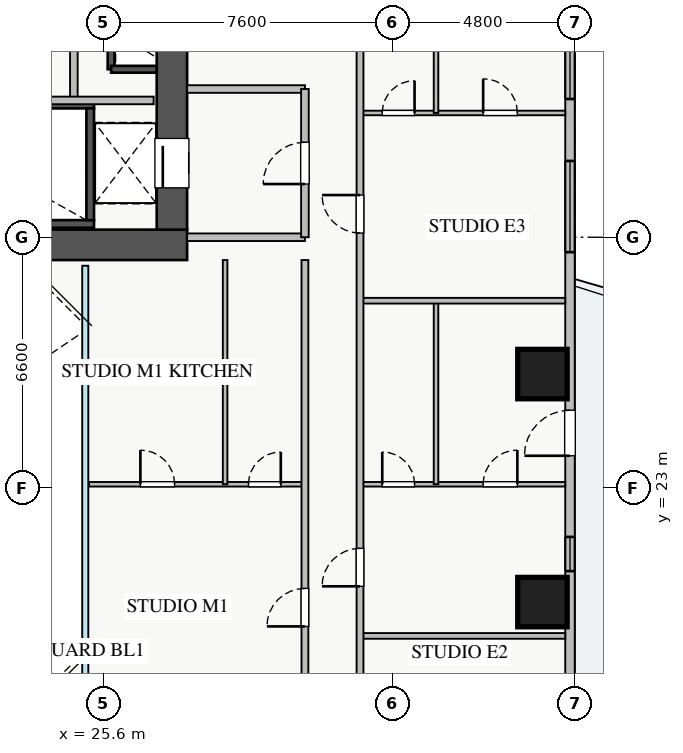
"""IFC4 building model, lengths in metres.
Left out: names, types, materials, properties, quantities, classifications, styles, units other than length and angle.
Written with IfcOpenShell. Run it as: python <this file> out.ifc"""

import sys

from ifc_helpers import new_model, si_unit, direction, frame, frame_2d, origin, origin_2d, place, context, subcontext, project, spatial, rectangle, extrude, source, transform, mapped, element, fill, save


model = new_model("IFC4")
c1 = context("Model", 3, precision=1e-05, world=origin(), true_north=direction((0.0, 1.0)))
c2 = subcontext(c1, "Body", "Model", "MODEL_VIEW")
j1 = project(units=[si_unit("LENGTHUNIT", "METRE"), si_unit("PLANEANGLEUNIT", "RADIAN")], contexts=[c1])
p1 = place(None, origin())
s1 = spatial("IfcSite", under=j1, at=p1, CompositionType="ELEMENT")
p2 = place(p1, origin())
s2 = spatial("IfcBuilding", under=s1, at=p2, CompositionType="ELEMENT")
p3 = place(p2, frame((0.0, 0.0, 42.5)))
s3 = spatial("IfcBuildingStorey", under=s2, at=p3, CompositionType="ELEMENT", Elevation=42.5)
p4 = place(p3, frame((25.8, 34.02, 0.0), z_axis=(0.0, 0.0, 1.0), x_axis=(0.0, 1.0, 0.0)))
e1 = element("IfcWall", 1, at=p4, inside=s3, PredefinedType="SHEAR", context=c2, shape_type="SweptSolid", body=[
    extrude(rectangle(XDim=1.06, YDim=0.18, at=frame_2d((0.53, 0.0))), origin(), (0.0, 0.0, 1.0), 3.03),
])
p5 = place(p3, frame((25.8, 34.02, 0.0), z_axis=(0.0, 0.0, 1.0), x_axis=(1.0, 0.0, 0.0)))
e2 = element("IfcWall", 2, at=p5, inside=s3, PredefinedType="SHEAR", context=c2, shape_type="SweptSolid", body=[
    extrude(rectangle(XDim=1.2, YDim=0.18, at=frame_2d((0.6, 0.0))), origin(), (0.0, 0.0, 1.0), 3.03),
])
p6 = place(p3, frame((18.2, 29.95, 0.0), z_axis=(0.0, 0.0, 1.0), x_axis=(1.0, 0.0, 0.0)))
e3 = element("IfcWall", 3, at=p6, inside=s3, PredefinedType="SHEAR", context=c2, shape_type="SweptSolid", body=[
    extrude(rectangle(XDim=7.15, YDim=0.2, at=frame_2d((3.575, 0.0))), origin(), (0.0, 0.0, 1.0), 3.25),
])
p7 = place(p3, frame((18.2, 33.09, 0.0), z_axis=(0.0, 0.0, 1.0), x_axis=(1.0, 0.0, 0.0)))
e4 = element("IfcWall", 4, at=p7, inside=s3, PredefinedType="SHEAR", context=c2, shape_type="SweptSolid", body=[
    extrude(rectangle(XDim=7.15, YDim=0.2, at=frame_2d((3.575, 0.0))), origin(), (0.0, 0.0, 1.0), 3.25),
])
p8 = place(p7, frame((0.35, 0.0, 0.0)))
e5 = element("IfcOpeningElement", 5, at=p8, cuts=e4, PredefinedType="OPENING", context=c2, shape_type="SweptSolid", body=[
    extrude(rectangle(XDim=1.1, YDim=2.05, at=frame_2d((0.55, 1.025))), frame((0.0, 0.11, 0.0), z_axis=(0.0, -1.0, 0.0), x_axis=(1.0, 0.0, 0.0)), (0.0, 0.0, 1.0), 0.22),
])
p9 = place(p3, frame((25.25, 30.05, 0.0), z_axis=(0.0, 0.0, 1.0), x_axis=(0.0, 1.0, 0.0)))
e6 = element("IfcWall", 6, at=p9, inside=s3, PredefinedType="SHEAR", context=c2, shape_type="SweptSolid", body=[
    extrude(rectangle(XDim=2.94, YDim=0.2, at=frame_2d((1.47, 0.0))), origin(), (0.0, 0.0, 1.0), 3.25),
])
p10 = place(p3, frame((10.2, 29.4, 0.0), z_axis=(0.0, 0.0, 1.0), x_axis=(1.0, 0.0, 0.0)))
e7 = element("IfcWall", 7, at=p10, inside=s3, PredefinedType="SHEAR", context=c2, shape_type="SweptSolid", body=[
    extrude(rectangle(XDim=17.6, YDim=0.8, at=frame_2d((8.8, 0.0))), origin(), (0.0, 0.0, 1.0), 3.25),
])
p11 = place(p3, frame((27.4, 29.8, 0.0), z_axis=(0.0, 0.0, 1.0), x_axis=(0.0, 1.0, 0.0)))
e8 = element("IfcWall", 8, at=p11, inside=s3, PredefinedType="SHEAR", context=c2, shape_type="SweptSolid", body=[
    extrude(rectangle(XDim=5.6, YDim=0.8, at=frame_2d((2.8, 0.0))), origin(), (0.0, 0.0, 1.0), 3.25),
])
p12 = place(p11, frame((1.1, 0.0, 0.0)))
e9 = element("IfcOpeningElement", 9, at=p12, cuts=e8, PredefinedType="OPENING", context=c2, shape_type="SweptSolid", body=[
    extrude(rectangle(XDim=1.3, YDim=2.05, at=frame_2d((0.65, 1.025))), frame((0.0, 0.41, 0.0), z_axis=(0.0, -1.0, 0.0), x_axis=(1.0, 0.0, 0.0)), (0.0, 0.0, 1.0), 0.82),
])
m1 = source(origin(), c2, "Body", "SweptSolid", [
    extrude(rectangle(XDim=1.3, YDim=1.3, at=origin_2d()), origin(), (0.0, 0.0, 1.0), 3.25),
])
for number, where, z_axis, x_axis in (
    (10, (37.15, 20.0, 0.0), (0.0, 0.0, 1.0), (1.0, 0.0, 0.0)),
    (11, (37.15, 26.0, 0.0), (0.0, 0.0, 1.0), (1.0, 0.0, 0.0)),
):
    element("IfcColumn", number, at=place(p3, frame(where, z_axis=z_axis, x_axis=x_axis)), inside=s3, PredefinedType="COLUMN", context=c2, shape_type="MappedRepresentation", body=[
        mapped(m1, transform((0.0, 0.0, 0.0), x_axis=(1.0, 0.0, 0.0), y_axis=(0.0, 1.0, 0.0), z_axis=(0.0, 0.0, 1.0), scale=1.0)),
    ])
p13 = place(p3, frame((37.875, 9.45, 0.0), z_axis=(0.0, 0.0, 1.0), x_axis=(0.0, 1.0, 0.0)))
e12 = element("IfcWall", 12, at=p13, inside=s3, PredefinedType="STANDARD", context=c2, shape_type="SweptSolid", body=[
    extrude(rectangle(XDim=27.1, YDim=0.25, at=frame_2d((13.55, 0.0))), origin(), (0.0, 0.0, 1.0), 2.57),
])
p14 = place(p13, frame((14.4, 0.0, 0.0)))
e13 = element("IfcOpeningElement", 13, at=p14, cuts=e12, PredefinedType="OPENING", context=c2, shape_type="SweptSolid", body=[
    extrude(rectangle(XDim=1.2, YDim=2.1, at=frame_2d((0.6, 1.05))), frame((0.0, 0.135, 0.0), z_axis=(0.0, -1.0, 0.0), x_axis=(1.0, 0.0, 0.0)), (0.0, 0.0, 1.0), 0.27),
])
p15 = place(p13, frame((2.188, 0.0, 0.9)))
e14 = element("IfcOpeningElement", 14, at=p15, cuts=e12, PredefinedType="OPENING", context=c2, shape_type="SweptSolid", body=[
    extrude(rectangle(XDim=2.4, YDim=1.48, at=frame_2d((1.2, 0.74))), frame((0.0, 0.135, 0.0), z_axis=(0.0, -1.0, 0.0), x_axis=(1.0, 0.0, 0.0)), (0.0, 0.0, 1.0), 0.27),
])
p16 = place(p13, frame((23.788, 0.0, 0.9)))
e15 = element("IfcOpeningElement", 15, at=p16, cuts=e12, PredefinedType="OPENING", context=c2, shape_type="SweptSolid", body=[
    extrude(rectangle(XDim=1.8, YDim=1.5, at=frame_2d((0.9, 0.75))), frame((0.0, 0.135, 0.0), z_axis=(0.0, -1.0, 0.0), x_axis=(1.0, 0.0, 0.0)), (0.0, 0.0, 1.0), 0.27),
])
p17 = place(p13, frame((19.758, 0.0, 0.9)))
e16 = element("IfcOpeningElement", 16, at=p17, cuts=e12, PredefinedType="OPENING", context=c2, shape_type="SweptSolid", body=[
    extrude(rectangle(XDim=2.4, YDim=1.5, at=frame_2d((1.2, 0.75))), frame((0.0, 0.135, 0.0), z_axis=(0.0, -1.0, 0.0), x_axis=(1.0, 0.0, 0.0)), (0.0, 0.0, 1.0), 0.27),
])
p18 = place(p13, frame((11.365, 0.0, 0.9)))
e17 = element("IfcOpeningElement", 17, at=p18, cuts=e12, PredefinedType="OPENING", context=c2, shape_type="SweptSolid", body=[
    extrude(rectangle(XDim=0.9, YDim=1.2, at=frame_2d((0.45, 0.6))), frame((0.0, 0.135, 0.0), z_axis=(0.0, -1.0, 0.0), x_axis=(1.0, 0.0, 0.0)), (0.0, 0.0, 1.0), 0.27),
])
for number, where, z_axis, x_axis in (
    (18, (27.8, 29.6, 0.0), (0.0, 0.0, 1.0), (1.0, 0.0, 0.0)),
    (19, (27.8, 33.5, 0.0), (0.0, 0.0, 1.0), (1.0, 0.0, 0.0)),
):
    element("IfcWall", number, at=place(p3, frame(where, z_axis=z_axis, x_axis=x_axis)), inside=s3, PredefinedType="PARTITIONING", context=c2, shape_type="SweptSolid", body=[
        extrude(rectangle(XDim=3.1, YDim=0.2, at=frame_2d((1.55, 0.0))), origin(), (0.0, 0.0, 1.0), 3.03),
    ])
p19 = place(p3, frame((30.9, 29.6, 0.0), z_axis=(0.0, 0.0, 1.0), x_axis=(0.0, 1.0, 0.0)))
e20 = element("IfcWall", 20, at=p19, inside=s3, PredefinedType="PARTITIONING", context=c2, shape_type="SweptSolid", body=[
    extrude(rectangle(XDim=3.9, YDim=0.2, at=frame_2d((1.95, 0.0))), origin(), (0.0, 0.0, 1.0), 3.03),
])
p20 = place(p19, frame((1.4, 0.0, 0.0)))
e21 = element("IfcOpeningElement", 21, at=p20, cuts=e20, PredefinedType="OPENING", context=c2, shape_type="SweptSolid", body=[
    extrude(rectangle(XDim=1.1, YDim=2.05, at=frame_2d((0.55, 1.025))), frame((0.0, 0.11, 0.0), z_axis=(0.0, -1.0, 0.0), x_axis=(1.0, 0.0, 0.0)), (0.0, 0.0, 1.0), 0.22),
])
p21 = place(p3, frame((24.82, 33.2, 0.0), z_axis=(0.0, 0.0, 1.0), x_axis=(0.0, 1.0, 0.0)))
e22 = element("IfcWall", 22, at=p21, inside=s3, PredefinedType="PARTITIONING", context=c2, shape_type="SweptSolid", body=[
    extrude(rectangle(XDim=2.65, YDim=0.2, at=frame_2d((1.325, 0.0))), origin(), (0.0, 0.0, 1.0), 3.03),
])
p22 = place(p3, frame((21.75, 33.2, 0.0), z_axis=(0.0, 0.0, 1.0), x_axis=(1.0, 0.0, 0.0)))
e23 = element("IfcWall", 23, at=p22, inside=s3, PredefinedType="PARTITIONING", context=c2, shape_type="SweptSolid", body=[
    extrude(rectangle(XDim=5.17, YDim=0.2, at=frame_2d((2.585, 0.0))), origin(), (0.0, 0.0, 1.0), 3.03),
])
p23 = place(p3, frame((32.35, 23.1, 0.0), z_axis=(0.0, 0.0, 1.0), x_axis=(1.0, 0.0, 0.0)))
e24 = element("IfcWall", 24, at=p23, inside=s3, PredefinedType="PLUMBINGWALL", context=c2, shape_type="SweptSolid", body=[
    extrude(rectangle(XDim=5.4, YDim=0.12, at=frame_2d((2.7, 0.0))), origin(), (0.0, 0.0, 1.0), 3.03),
])
p24 = place(p23, frame((0.585, 0.0, 0.0)))
e25 = element("IfcOpeningElement", 25, at=p24, cuts=e24, PredefinedType="OPENING", context=c2, shape_type="SweptSolid", body=[
    extrude(rectangle(XDim=0.85, YDim=2.05, at=frame_2d((0.425, 1.025))), frame((0.0, 0.07, 0.0), z_axis=(0.0, -1.0, 0.0), x_axis=(1.0, 0.0, 0.0)), (0.0, 0.0, 1.0), 0.14),
])
p25 = place(p23, frame((3.24, 0.0, 0.0)))
e26 = element("IfcOpeningElement", 26, at=p25, cuts=e24, PredefinedType="OPENING", context=c2, shape_type="SweptSolid", body=[
    extrude(rectangle(XDim=0.9, YDim=2.05, at=frame_2d((0.45, 1.025))), frame((0.0, 0.07, 0.0), z_axis=(0.0, -1.0, 0.0), x_axis=(1.0, 0.0, 0.0)), (0.0, 0.0, 1.0), 0.14),
])
p26 = place(p3, frame((34.35, 23.1, 0.0), z_axis=(0.0, 0.0, 1.0), x_axis=(0.0, 1.0, 0.0)))
e27 = element("IfcWall", 27, at=p26, inside=s3, PredefinedType="PLUMBINGWALL", context=c2, shape_type="SweptSolid", body=[
    extrude(rectangle(XDim=4.83, YDim=0.12, at=frame_2d((2.415, 0.0))), origin(), (0.0, 0.0, 1.0), 3.03),
])
p27 = place(p3, frame((32.35, 19.11, 0.0), z_axis=(0.0, 0.0, 1.0), x_axis=(1.0, 0.0, 0.0)))
e28 = element("IfcWall", 28, at=p27, inside=s3, PredefinedType="PARTITIONING", context=c2, shape_type="SweptSolid", body=[
    extrude(rectangle(XDim=5.4, YDim=0.15, at=frame_2d((2.7, 0.0))), origin(), (0.0, 0.0, 1.0), 3.03),
])
p28 = place(p3, frame((32.35, 32.87, 0.0), z_axis=(0.0, 0.0, 1.0), x_axis=(1.0, 0.0, 0.0)))
e29 = element("IfcWall", 29, at=p28, inside=s3, PredefinedType="PLUMBINGWALL", context=c2, shape_type="SweptSolid", body=[
    extrude(rectangle(XDim=5.4, YDim=0.12, at=frame_2d((2.7, 0.0))), origin(), (0.0, 0.0, 1.0), 3.03),
])
p29 = place(p28, frame((0.585, 0.0, 0.0)))
e30 = element("IfcOpeningElement", 30, at=p29, cuts=e29, PredefinedType="OPENING", context=c2, shape_type="SweptSolid", body=[
    extrude(rectangle(XDim=0.85, YDim=2.05, at=frame_2d((0.425, 1.025))), frame((0.0, 0.07, 0.0), z_axis=(0.0, -1.0, 0.0), x_axis=(1.0, 0.0, 0.0)), (0.0, 0.0, 1.0), 0.14),
])
p30 = place(p28, frame((3.24, 0.0, 0.0)))
e31 = element("IfcOpeningElement", 31, at=p30, cuts=e29, PredefinedType="OPENING", context=c2, shape_type="SweptSolid", body=[
    extrude(rectangle(XDim=0.9, YDim=2.05, at=frame_2d((0.45, 1.025))), frame((0.0, 0.07, 0.0), z_axis=(0.0, -1.0, 0.0), x_axis=(1.0, 0.0, 0.0)), (0.0, 0.0, 1.0), 0.14),
])
p31 = place(p3, frame((34.35, 32.87, 0.0), z_axis=(0.0, 0.0, 1.0), x_axis=(0.0, 1.0, 0.0)))
e32 = element("IfcWall", 32, at=p31, inside=s3, PredefinedType="PLUMBINGWALL", context=c2, shape_type="SweptSolid", body=[
    extrude(rectangle(XDim=4.21, YDim=0.12, at=frame_2d((2.105, 0.0))), origin(), (0.0, 0.0, 1.0), 3.03),
])
p32 = place(p3, frame((32.35, 27.93, 0.0), z_axis=(0.0, 0.0, 1.0), x_axis=(1.0, 0.0, 0.0)))
e33 = element("IfcWall", 33, at=p32, inside=s3, PredefinedType="PARTITIONING", context=c2, shape_type="SweptSolid", body=[
    extrude(rectangle(XDim=5.4, YDim=0.15, at=frame_2d((2.7, 0.0))), origin(), (0.0, 0.0, 1.0), 2.731),
])
p33 = place(p3, frame((32.35, 7.21, 0.0), z_axis=(0.0, 0.0, 1.0), x_axis=(0.0, 1.0, 0.0)))
e34 = element("IfcWall", 34, at=p33, inside=s3, PredefinedType="PARTITIONING", context=c2, shape_type="SweptSolid", body=[
    extrude(rectangle(XDim=31.23, YDim=0.18, at=frame_2d((15.615, 0.0))), origin(), (0.0, 0.0, 1.0), 2.825),
])
p34 = place(p33, frame((30.09, 0.0, 0.0)))
e35 = element("IfcOpeningElement", 35, at=p34, cuts=e34, PredefinedType="OPENING", context=c2, shape_type="SweptSolid", body=[
    extrude(rectangle(XDim=0.9, YDim=2.05, at=frame_2d((0.45, 1.025))), frame((0.0, 0.1, 0.0), z_axis=(0.0, -1.0, 0.0), x_axis=(1.0, 0.0, 0.0)), (0.0, 0.0, 1.0), 0.2),
])
p35 = place(p33, frame((0.415, 0.0, 0.0)))
e36 = element("IfcOpeningElement", 36, at=p35, cuts=e34, PredefinedType="OPENING", context=c2, shape_type="SweptSolid", body=[
    extrude(rectangle(XDim=0.9, YDim=2.05, at=frame_2d((0.45, 1.025))), frame((0.0, 0.1, 0.0), z_axis=(0.0, -1.0, 0.0), x_axis=(1.0, 0.0, 0.0)), (0.0, 0.0, 1.0), 0.2),
])
p36 = place(p33, frame((6.305, 0.0, 0.0)))
e37 = element("IfcOpeningElement", 37, at=p36, cuts=e34, PredefinedType="OPENING", context=c2, shape_type="SweptSolid", body=[
    extrude(rectangle(XDim=1.0, YDim=2.05, at=frame_2d((0.5, 1.025))), frame((0.0, 0.1, 0.0), z_axis=(0.0, -1.0, 0.0), x_axis=(1.0, 0.0, 0.0)), (0.0, 0.0, 1.0), 0.2),
])
p37 = place(p33, frame((13.205, 0.0, 0.0)))
e38 = element("IfcOpeningElement", 38, at=p37, cuts=e34, PredefinedType="OPENING", context=c2, shape_type="SweptSolid", body=[
    extrude(rectangle(XDim=1.0, YDim=2.05, at=frame_2d((0.5, 1.025))), frame((0.0, 0.1, 0.0), z_axis=(0.0, -1.0, 0.0), x_axis=(1.0, 0.0, 0.0)), (0.0, 0.0, 1.0), 0.2),
])
p38 = place(p33, frame((22.5, 0.0, 0.0)))
e39 = element("IfcOpeningElement", 39, at=p38, cuts=e34, PredefinedType="OPENING", context=c2, shape_type="SweptSolid", body=[
    extrude(rectangle(XDim=1.0, YDim=2.05, at=frame_2d((0.5, 1.025))), frame((0.0, 0.1, 0.0), z_axis=(0.0, -1.0, 0.0), x_axis=(1.0, 0.0, 0.0)), (0.0, 0.0, 1.0), 0.2),
])
p39 = place(p3, frame((25.22, 23.1, 0.0), z_axis=(0.0, 0.0, 1.0), x_axis=(1.0, 0.0, 0.0)))
e40 = element("IfcWall", 40, at=p39, inside=s3, PredefinedType="PLUMBINGWALL", context=c2, shape_type="SweptSolid", body=[
    extrude(rectangle(XDim=5.68, YDim=0.12, at=frame_2d((2.84, 0.0))), origin(), (0.0, 0.0, 1.0), 3.03),
])
p40 = place(p39, frame((1.35, 0.0, 0.0)))
e41 = element("IfcOpeningElement", 41, at=p40, cuts=e40, PredefinedType="OPENING", context=c2, shape_type="SweptSolid", body=[
    extrude(rectangle(XDim=0.9, YDim=2.05, at=frame_2d((0.45, 1.025))), frame((0.0, 0.07, 0.0), z_axis=(0.0, -1.0, 0.0), x_axis=(1.0, 0.0, 0.0)), (0.0, 0.0, 1.0), 0.14),
])
p41 = place(p39, frame((4.195, 0.0, 0.0)))
e42 = element("IfcOpeningElement", 42, at=p41, cuts=e40, PredefinedType="OPENING", context=c2, shape_type="SweptSolid", body=[
    extrude(rectangle(XDim=0.85, YDim=2.05, at=frame_2d((0.425, 1.025))), frame((0.0, 0.07, 0.0), z_axis=(0.0, -1.0, 0.0), x_axis=(1.0, 0.0, 0.0)), (0.0, 0.0, 1.0), 0.14),
])
p42 = place(p3, frame((28.8, 23.1, 0.0), z_axis=(0.0, 0.0, 1.0), x_axis=(0.0, 1.0, 0.0)))
e43 = element("IfcWall", 43, at=p42, inside=s3, PredefinedType="PLUMBINGWALL", context=c2, shape_type="SweptSolid", body=[
    extrude(rectangle(XDim=5.9, YDim=0.12, at=frame_2d((2.95, 0.0))), origin(), (0.0, 0.0, 1.0), 3.03),
])
p43 = place(p3, frame((30.9, 17.0, 0.0), z_axis=(0.0, 0.0, 1.0), x_axis=(0.0, 1.0, 0.0)))
e44 = element("IfcWall", 44, at=p43, inside=s3, PredefinedType="PARTITIONING", context=c2, shape_type="SweptSolid", body=[
    extrude(rectangle(XDim=12.0, YDim=0.18, at=frame_2d((6.0, 0.0))), origin(), (0.0, 0.0, 1.0), 3.03),
])
p44 = place(p43, frame((2.36, 0.0, 0.0)))
e45 = element("IfcOpeningElement", 45, at=p44, cuts=e44, PredefinedType="OPENING", context=c2, shape_type="SweptSolid", body=[
    extrude(rectangle(XDim=1.0, YDim=2.05, at=frame_2d((0.5, 1.025))), frame((0.0, 0.1, 0.0), z_axis=(0.0, -1.0, 0.0), x_axis=(1.0, 0.0, 0.0)), (0.0, 0.0, 1.0), 0.2),
])
m2 = source(origin(), c2, "Body", "SweptSolid", [
    extrude(rectangle(XDim=1.2, YDim=2.1, at=frame_2d((0.6, 1.05))), frame((0.0, 0.025, 0.0), z_axis=(0.0, -1.0, 0.0), x_axis=(1.0, 0.0, 0.0)), (0.0, 0.0, 1.0), 0.05),
])
p45 = place(p14, origin())
e46 = element("IfcDoor", 46, at=p45, inside=s3, OperationType="SINGLE_SWING_LEFT", PredefinedType="DOOR", context=c2, shape_type="MappedRepresentation", body=[
    mapped(m2, transform((0.0, 0.0, 0.0), x_axis=(1.0, 0.0, 0.0), y_axis=(0.0, 1.0, 0.0), z_axis=(0.0, 0.0, 1.0), scale=1.0)),
])
fill(e13, e46)
m3 = source(origin(), c2, "Body", "SweptSolid", [
    extrude(rectangle(XDim=1.8, YDim=1.5, at=frame_2d((0.9, 0.75))), frame((0.0, 0.03, 0.0), z_axis=(0.0, -1.0, 0.0), x_axis=(1.0, 0.0, 0.0)), (0.0, 0.0, 1.0), 0.06),
])
p46 = place(p16, origin())
e47 = element("IfcWindow", 47, at=p46, inside=s3, PartitioningType="TRIPLE_PANEL_VERTICAL", PredefinedType="WINDOW", context=c2, shape_type="MappedRepresentation", body=[
    mapped(m3, transform((0.0, 0.0, 0.0), x_axis=(1.0, 0.0, 0.0), y_axis=(0.0, 1.0, 0.0), z_axis=(0.0, 0.0, 1.0), scale=1.0)),
])
fill(e15, e47)
m4 = source(origin(), c2, "Body", "SweptSolid", [
    extrude(rectangle(XDim=1.3, YDim=2.05, at=frame_2d((0.65, 1.025))), frame((0.0, 0.025, 0.0), z_axis=(0.0, -1.0, 0.0), x_axis=(1.0, 0.0, 0.0)), (0.0, 0.0, 1.0), 0.05),
])
p47 = place(p12, origin())
e48 = element("IfcDoor", 48, at=p47, inside=s3, OperationType="SLIDING_TO_LEFT", PredefinedType="DOOR", context=c2, shape_type="MappedRepresentation", body=[
    mapped(m4, transform((0.0, 0.0, 0.0), x_axis=(1.0, 0.0, 0.0), y_axis=(0.0, 1.0, 0.0), z_axis=(0.0, 0.0, 1.0), scale=1.0)),
])
fill(e9, e48)
m5 = source(origin(), c2, "Body", "SweptSolid", [
    extrude(rectangle(XDim=1.1, YDim=2.05, at=frame_2d((0.55, 1.025))), frame((0.0, 0.025, 0.0), z_axis=(0.0, -1.0, 0.0), x_axis=(1.0, 0.0, 0.0)), (0.0, 0.0, 1.0), 0.05),
])
p48 = place(p20, origin())
e49 = element("IfcDoor", 49, at=p48, inside=s3, OperationType="SINGLE_SWING_LEFT", PredefinedType="DOOR", context=c2, shape_type="MappedRepresentation", body=[
    mapped(m5, transform((0.0, 0.0, 0.0), x_axis=(1.0, 0.0, 0.0), y_axis=(0.0, 1.0, 0.0), z_axis=(0.0, 0.0, 1.0), scale=1.0)),
])
fill(e21, e49)
m6 = source(origin(), c2, "Body", "SweptSolid", [
    extrude(rectangle(XDim=0.85, YDim=2.05, at=frame_2d((0.425, 1.025))), frame((0.0, 0.025, 0.0), z_axis=(0.0, -1.0, 0.0), x_axis=(1.0, 0.0, 0.0)), (0.0, 0.0, 1.0), 0.05),
])
p49 = place(p24, origin())
e50 = element("IfcDoor", 50, at=p49, inside=s3, OperationType="SINGLE_SWING_LEFT", PredefinedType="DOOR", context=c2, shape_type="MappedRepresentation", body=[
    mapped(m6, transform((0.0, 0.0, 0.0), x_axis=(1.0, 0.0, 0.0), y_axis=(0.0, 1.0, 0.0), z_axis=(0.0, 0.0, 1.0), scale=1.0)),
])
fill(e25, e50)
m7 = source(origin(), c2, "Body", "SweptSolid", [
    extrude(rectangle(XDim=0.9, YDim=2.05, at=frame_2d((0.45, 1.025))), frame((0.0, 0.025, 0.0), z_axis=(0.0, -1.0, 0.0), x_axis=(1.0, 0.0, 0.0)), (0.0, 0.0, 1.0), 0.05),
])
p50 = place(p25, origin())
e51 = element("IfcDoor", 51, at=p50, inside=s3, OperationType="SINGLE_SWING_RIGHT", PredefinedType="DOOR", context=c2, shape_type="MappedRepresentation", body=[
    mapped(m7, transform((0.0, 0.0, 0.0), x_axis=(1.0, 0.0, 0.0), y_axis=(0.0, 1.0, 0.0), z_axis=(0.0, 0.0, 1.0), scale=1.0)),
])
fill(e26, e51)
p51 = place(p29, origin())
e52 = element("IfcDoor", 52, at=p51, inside=s3, OperationType="SINGLE_SWING_RIGHT", PredefinedType="DOOR", context=c2, shape_type="MappedRepresentation", body=[
    mapped(m6, transform((0.0, 0.0, 0.0), x_axis=(1.0, 0.0, 0.0), y_axis=(0.0, 1.0, 0.0), z_axis=(0.0, 0.0, 1.0), scale=1.0)),
])
fill(e30, e52)
p52 = place(p30, origin())
e53 = element("IfcDoor", 53, at=p52, inside=s3, OperationType="SINGLE_SWING_LEFT", PredefinedType="DOOR", context=c2, shape_type="MappedRepresentation", body=[
    mapped(m7, transform((0.0, 0.0, 0.0), x_axis=(1.0, 0.0, 0.0), y_axis=(0.0, 1.0, 0.0), z_axis=(0.0, 0.0, 1.0), scale=1.0)),
])
fill(e31, e53)
m8 = source(origin(), c2, "Body", "SweptSolid", [
    extrude(rectangle(XDim=1.0, YDim=2.05, at=frame_2d((0.5, 1.025))), frame((0.0, 0.025, 0.0), z_axis=(0.0, -1.0, 0.0), x_axis=(1.0, 0.0, 0.0)), (0.0, 0.0, 1.0), 0.05),
])
p53 = place(p37, origin())
e54 = element("IfcDoor", 54, at=p53, inside=s3, OperationType="SINGLE_SWING_LEFT", PredefinedType="DOOR", context=c2, shape_type="MappedRepresentation", body=[
    mapped(m8, transform((0.0, 0.0, 0.0), x_axis=(1.0, 0.0, 0.0), y_axis=(0.0, 1.0, 0.0), z_axis=(0.0, 0.0, 1.0), scale=1.0)),
])
fill(e38, e54)
p54 = place(p38, origin())
e55 = element("IfcDoor", 55, at=p54, inside=s3, OperationType="SINGLE_SWING_RIGHT", PredefinedType="DOOR", context=c2, shape_type="MappedRepresentation", body=[
    mapped(m8, transform((0.0, 0.0, 0.0), x_axis=(1.0, 0.0, 0.0), y_axis=(0.0, 1.0, 0.0), z_axis=(0.0, 0.0, 1.0), scale=1.0)),
])
fill(e39, e55)
p55 = place(p40, origin())
e56 = element("IfcDoor", 56, at=p55, inside=s3, OperationType="SINGLE_SWING_LEFT", PredefinedType="DOOR", context=c2, shape_type="MappedRepresentation", body=[
    mapped(m7, transform((0.0, 0.0, 0.0), x_axis=(1.0, 0.0, 0.0), y_axis=(0.0, 1.0, 0.0), z_axis=(0.0, 0.0, 1.0), scale=1.0)),
])
fill(e41, e56)
p56 = place(p41, origin())
e57 = element("IfcDoor", 57, at=p56, inside=s3, OperationType="SINGLE_SWING_RIGHT", PredefinedType="DOOR", context=c2, shape_type="MappedRepresentation", body=[
    mapped(m6, transform((0.0, 0.0, 0.0), x_axis=(1.0, 0.0, 0.0), y_axis=(0.0, 1.0, 0.0), z_axis=(0.0, 0.0, 1.0), scale=1.0)),
])
fill(e42, e57)
p57 = place(p44, origin())
e58 = element("IfcDoor", 58, at=p57, inside=s3, OperationType="SINGLE_SWING_LEFT", PredefinedType="DOOR", context=c2, shape_type="MappedRepresentation", body=[
    mapped(m8, transform((0.0, 0.0, 0.0), x_axis=(1.0, 0.0, 0.0), y_axis=(0.0, 1.0, 0.0), z_axis=(0.0, 0.0, 1.0), scale=1.0)),
])
fill(e45, e58)
m9 = source(origin(), c2, "Body", "SweptSolid", [
    extrude(rectangle(XDim=2.4, YDim=1.5, at=frame_2d((1.2, 0.75))), frame((0.0, 0.03, 0.0), z_axis=(0.0, -1.0, 0.0), x_axis=(1.0, 0.0, 0.0)), (0.0, 0.0, 1.0), 0.06),
])
p58 = place(p17, origin())
e59 = element("IfcWindow", 59, at=p58, inside=s3, PartitioningType="TRIPLE_PANEL_VERTICAL", PredefinedType="WINDOW", context=c2, shape_type="MappedRepresentation", body=[
    mapped(m9, transform((0.0, 0.0, 0.0), x_axis=(1.0, 0.0, 0.0), y_axis=(0.0, 1.0, 0.0), z_axis=(0.0, 0.0, 1.0), scale=1.0)),
])
fill(e16, e59)
m10 = source(origin(), c2, "Body", "SweptSolid", [
    extrude(rectangle(XDim=0.9, YDim=1.2, at=frame_2d((0.45, 0.6))), frame((0.0, 0.03, 0.0), z_axis=(0.0, -1.0, 0.0), x_axis=(1.0, 0.0, 0.0)), (0.0, 0.0, 1.0), 0.06),
])
p59 = place(p18, origin())
e60 = element("IfcWindow", 60, at=p59, inside=s3, PartitioningType="SINGLE_PANEL", PredefinedType="WINDOW", context=c2, shape_type="MappedRepresentation", body=[
    mapped(m10, transform((0.0, 0.0, 0.0), x_axis=(1.0, 0.0, 0.0), y_axis=(0.0, 1.0, 0.0), z_axis=(0.0, 0.0, 1.0), scale=1.0)),
])
fill(e17, e60)
save(model, sys.argv[1])
